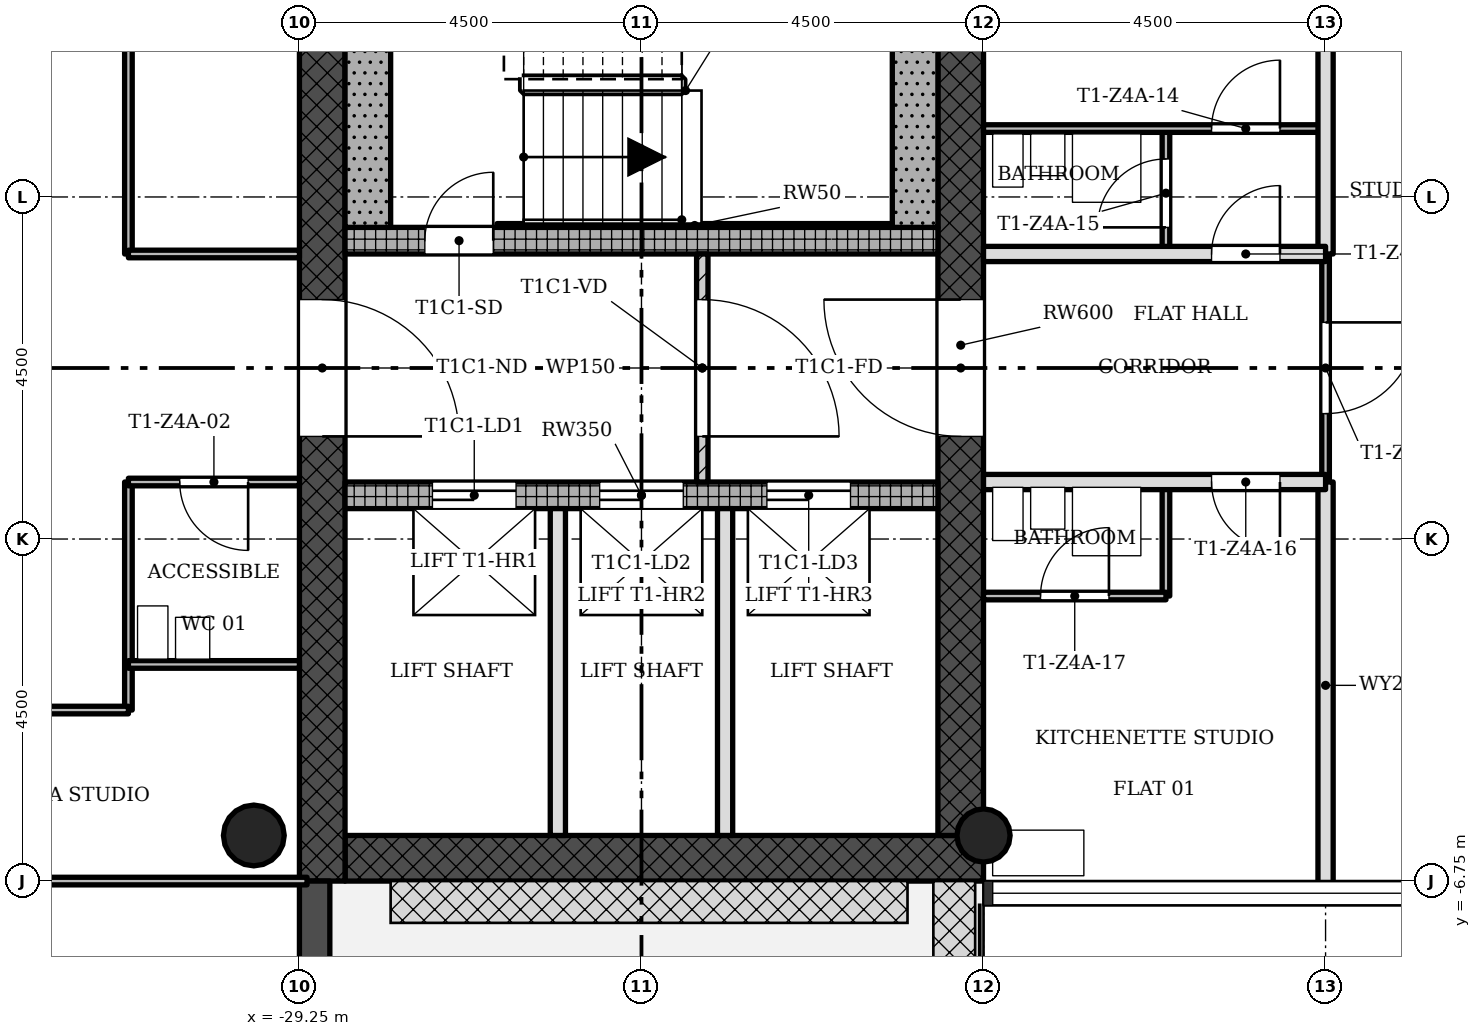
"""IFC4 building model, lengths in metres.
Left out: names, types, materials, properties, quantities, classifications, styles, units other than length and angle.
Written with IfcOpenShell. Run it as: python <this file> out.ifc"""

import sys

from ifc_helpers import new_model, si_unit, direction, frame, frame_2d, origin, origin_2d, place, context, subcontext, project, spatial, rectangle, hollow_circle, extrude, element, fill, save


model = new_model("IFC4")
c1 = context("Model", 3, precision=1e-05, world=origin(), true_north=direction((0.0, 1.0)))
c2 = subcontext(c1, "Body", "Model", "MODEL_VIEW")
j1 = project(units=[si_unit("LENGTHUNIT", "METRE"), si_unit("PLANEANGLEUNIT", "RADIAN")], contexts=[c1])
p1 = place(None, origin())
s1 = spatial("IfcSite", under=j1, at=p1, CompositionType="ELEMENT")
p2 = place(p1, origin())
s2 = spatial("IfcBuilding", under=s1, at=p2, CompositionType="ELEMENT")
p3 = place(p2, frame((0.0, 0.0, 226.6)))
s3 = spatial("IfcBuildingStorey", under=s2, at=p3, CompositionType="ELEMENT", Elevation=226.6)
p4 = place(p3, frame((-28.65, -6.45, 0.0), z_axis=(0.0, 0.0, 1.0), x_axis=(1.0, 0.0, 0.0)))
e1 = element("IfcWall", 1, at=p4, inside=s3, PredefinedType="SHEAR", context=c2, shape_type="SweptSolid", body=[
    extrude(rectangle(XDim=8.4, YDim=0.6, at=frame_2d((4.2, 0.0))), origin(), (0.0, 0.0, 1.0), 3.4),
])
p5 = place(p3, frame((-20.55, -6.15, 0.0), z_axis=(0.0, 0.0, 1.0), x_axis=(0.0, 1.0, 0.0)))
e2 = element("IfcWall", 2, at=p5, inside=s3, PredefinedType="SHEAR", context=c2, shape_type="SweptSolid", body=[
    extrude(rectangle(XDim=12.9, YDim=0.6, at=frame_2d((6.45, 0.0))), origin(), (0.0, 0.0, 1.0), 3.4),
])
p6 = place(p5, frame((5.25, 0.0, 0.0)))
e3 = element("IfcOpeningElement", 3, at=p6, cuts=e2, PredefinedType="OPENING", context=c2, shape_type="SweptSolid", body=[
    extrude(rectangle(XDim=1.8, YDim=2.1, at=frame_2d((0.9, 1.05))), frame((0.0, 0.31, 0.0), z_axis=(0.0, -1.0, 0.0), x_axis=(1.0, 0.0, 0.0)), (0.0, 0.0, 1.0), 0.62),
])
p7 = place(p3, frame((-28.95, 6.15, 0.0), z_axis=(0.0, 0.0, 1.0), x_axis=(0.0, -1.0, 0.0)))
e4 = element("IfcWall", 4, at=p7, inside=s3, PredefinedType="SHEAR", context=c2, shape_type="SweptSolid", body=[
    extrude(rectangle(XDim=12.9, YDim=0.6, at=frame_2d((6.45, 0.0))), origin(), (0.0, 0.0, 1.0), 3.4),
])
p8 = place(p7, frame((5.25, 0.0, 0.0)))
e5 = element("IfcOpeningElement", 5, at=p8, cuts=e4, PredefinedType="OPENING", context=c2, shape_type="SweptSolid", body=[
    extrude(rectangle(XDim=1.8, YDim=2.1, at=frame_2d((0.9, 1.05))), frame((0.0, 0.31, 0.0), z_axis=(0.0, -1.0, 0.0), x_axis=(1.0, 0.0, 0.0)), (0.0, 0.0, 1.0), 0.62),
])
p9 = place(p3, frame((-28.65, -1.675, 0.0), z_axis=(0.0, 0.0, 1.0), x_axis=(1.0, 0.0, 0.0)))
e6 = element("IfcWall", 6, at=p9, inside=s3, PredefinedType="SHEAR", context=c2, shape_type="SweptSolid", body=[
    extrude(rectangle(XDim=7.8, YDim=0.35, at=frame_2d((3.9, 0.0))), origin(), (0.0, 0.0, 1.0), 3.4),
])
p10 = place(p9, frame((1.15, 0.0, 0.0)))
e7 = element("IfcOpeningElement", 7, at=p10, cuts=e6, PredefinedType="OPENING", context=c2, shape_type="SweptSolid", body=[
    extrude(rectangle(XDim=1.1, YDim=2.1, at=frame_2d((0.55, 1.05))), frame((0.0, 0.185, 0.0), z_axis=(0.0, -1.0, 0.0), x_axis=(1.0, 0.0, 0.0)), (0.0, 0.0, 1.0), 0.37),
])
p11 = place(p9, frame((3.35, 0.0, 0.0)))
e8 = element("IfcOpeningElement", 8, at=p11, cuts=e6, PredefinedType="OPENING", context=c2, shape_type="SweptSolid", body=[
    extrude(rectangle(XDim=1.1, YDim=2.1, at=frame_2d((0.55, 1.05))), frame((0.0, 0.185, 0.0), z_axis=(0.0, -1.0, 0.0), x_axis=(1.0, 0.0, 0.0)), (0.0, 0.0, 1.0), 0.37),
])
p12 = place(p9, frame((5.55, 0.0, 0.0)))
e9 = element("IfcOpeningElement", 9, at=p12, cuts=e6, PredefinedType="OPENING", context=c2, shape_type="SweptSolid", body=[
    extrude(rectangle(XDim=1.1, YDim=2.1, at=frame_2d((0.55, 1.05))), frame((0.0, 0.185, 0.0), z_axis=(0.0, -1.0, 0.0), x_axis=(1.0, 0.0, 0.0)), (0.0, 0.0, 1.0), 0.37),
])
p13 = place(p3, frame((-28.65, 1.675, 0.0), z_axis=(0.0, 0.0, 1.0), x_axis=(1.0, 0.0, 0.0)))
e10 = element("IfcWall", 10, at=p13, inside=s3, PredefinedType="SHEAR", context=c2, shape_type="SweptSolid", body=[
    extrude(rectangle(XDim=7.8, YDim=0.35, at=frame_2d((3.9, 0.0))), origin(), (0.0, 0.0, 1.0), 3.4),
])
p14 = place(p13, frame((1.05, 0.0, 0.0)))
e11 = element("IfcOpeningElement", 11, at=p14, cuts=e10, PredefinedType="OPENING", context=c2, shape_type="SweptSolid", body=[
    extrude(rectangle(XDim=0.9, YDim=2.1, at=frame_2d((0.45, 1.05))), frame((0.0, 0.185, 0.0), z_axis=(0.0, -1.0, 0.0), x_axis=(1.0, 0.0, 0.0)), (0.0, 0.0, 1.0), 0.37),
])
p15 = place(p3, frame((-20.25, -6.15, 0.0), z_axis=(0.0, 0.0, 1.0), x_axis=(1.0, 0.0, 0.0)))
e12 = element("IfcColumn", 12, at=p15, inside=s3, PredefinedType="COLUMN", context=c2, shape_type="SweptSolid", body=[
    extrude(hollow_circle(Radius=0.35, WallThickness=0.025, at=origin_2d()), origin(), (0.0, 0.0, 1.0), 3.4),
])
p16 = place(p3, frame((-29.85, -6.15, 0.0), z_axis=(0.0, 0.0, 1.0), x_axis=(1.0, 0.0, 0.0)))
e13 = element("IfcColumn", 13, at=p16, inside=s3, PredefinedType="COLUMN", context=c2, shape_type="SweptSolid", body=[
    extrude(hollow_circle(Radius=0.4, WallThickness=0.028, at=origin_2d()), origin(), (0.0, 0.0, 1.0), 3.4),
])
p17 = place(p3, frame((-29.05, -11.25, -0.02), z_axis=(0.0, 0.0, 1.0), x_axis=(0.0, 1.0, 0.0)))
e14 = element("IfcWall", 14, at=p17, inside=s3, PredefinedType="STANDARD", context=c2, shape_type="SweptSolid", body=[
    extrude(rectangle(XDim=4.5, YDim=0.4, at=frame_2d((2.25, 0.0))), origin(), (0.0, 0.0, 1.0), 3.12),
])
p18 = place(p17, frame((1.35, 0.0, 0.02)))
e15 = element("IfcOpeningElement", 15, at=p18, cuts=e14, PredefinedType="OPENING", context=c2, shape_type="SweptSolid", body=[
    extrude(rectangle(XDim=1.8, YDim=2.1, at=frame_2d((0.9, 1.05))), frame((0.0, 0.21, 0.0), z_axis=(0.0, -1.0, 0.0), x_axis=(1.0, 0.0, 0.0)), (0.0, 0.0, 1.0), 0.42),
])
p19 = place(p3, frame((-23.95, -1.5, 0.0), z_axis=(0.0, 0.0, 1.0), x_axis=(0.0, 1.0, 0.0)))
e16 = element("IfcWall", 16, at=p19, inside=s3, PredefinedType="PARTITIONING", context=c2, shape_type="SweptSolid", body=[
    extrude(rectangle(XDim=3.0, YDim=0.15, at=frame_2d((1.5, 0.0))), origin(), (0.0, 0.0, 1.0), 3.0),
])
p20 = place(p19, frame((0.6, 0.0, 0.0)))
e17 = element("IfcOpeningElement", 17, at=p20, cuts=e16, PredefinedType="OPENING", context=c2, shape_type="SweptSolid", body=[
    extrude(rectangle(XDim=1.8, YDim=2.1, at=frame_2d((0.9, 1.05))), frame((0.0, 0.085, 0.0), z_axis=(0.0, -1.0, 0.0), x_axis=(1.0, 0.0, 0.0)), (0.0, 0.0, 1.0), 0.17),
])
for number, where, z_axis, x_axis in (
    (18, (-25.85, -6.15, 0.0), (0.0, 0.0, 1.0), (0.0, 1.0, 0.0)),
    (19, (-23.65, -6.15, 0.0), (0.0, 0.0, 1.0), (0.0, 1.0, 0.0)),
):
    element("IfcWall", number, at=place(p3, frame(where, z_axis=z_axis, x_axis=x_axis)), inside=s3, PredefinedType="SOLIDWALL", context=c2, shape_type="SweptSolid", body=[
        extrude(rectangle(XDim=4.3, YDim=0.2, at=frame_2d((2.15, 0.0))), origin(), (0.0, 0.0, 1.0), 3.0),
    ])
for number, where, z_axis, x_axis in (
    (20, (-31.5, -4.5, 0.0), (0.0, 0.0, 1.0), (0.0, 1.0, 0.0)),
    (21, (-31.5, 1.5, 0.0), (0.0, 0.0, 1.0), (0.0, 1.0, 0.0)),
):
    element("IfcWall", number, at=place(p3, frame(where, z_axis=z_axis, x_axis=x_axis)), inside=s3, PredefinedType="PARTITIONING", context=c2, shape_type="SweptSolid", body=[
        extrude(rectangle(XDim=3.0, YDim=0.1, at=frame_2d((1.5, 0.0))), origin(), (0.0, 0.0, 1.0), 3.0),
    ])
p21 = place(p3, frame((-17.85, -3.0, 0.0), z_axis=(0.0, 0.0, 1.0), x_axis=(0.0, 1.0, 0.0)))
e22 = element("IfcWall", 22, at=p21, inside=s3, PredefinedType="PARTITIONING", context=c2, shape_type="SweptSolid", body=[
    extrude(rectangle(XDim=1.5, YDim=0.1, at=frame_2d((0.75, 0.0))), origin(), (0.0, 0.0, 1.0), 3.0),
])
p22 = place(p3, frame((-17.85, 1.5, 0.0), z_axis=(0.0, 0.0, 1.0), x_axis=(0.0, 1.0, 0.0)))
e23 = element("IfcWall", 23, at=p22, inside=s3, PredefinedType="PARTITIONING", context=c2, shape_type="SweptSolid", body=[
    extrude(rectangle(XDim=1.65, YDim=0.1, at=frame_2d((0.825, 0.0))), origin(), (0.0, 0.0, 1.0), 3.0),
])
p23 = place(p22, frame((0.35, 0.0, 0.0)))
e24 = element("IfcOpeningElement", 24, at=p23, cuts=e23, PredefinedType="OPENING", context=c2, shape_type="SweptSolid", body=[
    extrude(rectangle(XDim=0.9, YDim=2.1, at=frame_2d((0.45, 1.05))), frame((0.0, 0.06, 0.0), z_axis=(0.0, -1.0, 0.0), x_axis=(1.0, 0.0, 0.0)), (0.0, 0.0, 1.0), 0.12),
])
p24 = place(p3, frame((-15.75, -1.5, 0.0), z_axis=(0.0, 0.0, 1.0), x_axis=(0.0, 1.0, 0.0)))
e25 = element("IfcWall", 25, at=p24, inside=s3, PredefinedType="PARTITIONING", context=c2, shape_type="SweptSolid", body=[
    extrude(rectangle(XDim=3.0, YDim=0.1, at=frame_2d((1.5, 0.0))), origin(), (0.0, 0.0, 1.0), 3.0),
])
p25 = place(p24, frame((0.9, 0.0, 0.0)))
e26 = element("IfcOpeningElement", 26, at=p25, cuts=e25, PredefinedType="OPENING", context=c2, shape_type="SweptSolid", body=[
    extrude(rectangle(XDim=1.2, YDim=2.1, at=frame_2d((0.6, 1.05))), frame((0.0, 0.06, 0.0), z_axis=(0.0, -1.0, 0.0), x_axis=(1.0, 0.0, 0.0)), (0.0, 0.0, 1.0), 0.12),
])
for number, where, z_axis, x_axis in (
    (27, (-15.75, -6.85, 0.0), (0.0, 0.0, 1.0), (0.0, 1.0, 0.0)),
    (28, (-15.75, 1.5, 0.0), (0.0, 0.0, 1.0), (0.0, 1.0, 0.0)),
):
    element("IfcWall", number, at=place(p3, frame(where, z_axis=z_axis, x_axis=x_axis)), inside=s3, PredefinedType="SOLIDWALL", context=c2, shape_type="SweptSolid", body=[
        extrude(rectangle(XDim=5.35, YDim=0.2, at=frame_2d((2.675, 0.0))), origin(), (0.0, 0.0, 1.0), 3.0),
    ])
p26 = place(p3, frame((-35.1, -6.75, 0.0), z_axis=(0.0, 0.0, 1.0), x_axis=(1.0, 0.0, 0.0)))
e29 = element("IfcWall", 29, at=p26, inside=s3, PredefinedType="PARTITIONING", context=c2, shape_type="SweptSolid", body=[
    extrude(rectangle(XDim=5.95, YDim=0.1, at=frame_2d((2.975, 0.0))), origin(), (0.0, 0.0, 1.0), 3.0),
])
p27 = place(p3, frame((-35.1, -4.5, 0.0), z_axis=(0.0, 0.0, 1.0), x_axis=(1.0, 0.0, 0.0)))
e30 = element("IfcWall", 30, at=p27, inside=s3, PredefinedType="PARTITIONING", context=c2, shape_type="SweptSolid", body=[
    extrude(rectangle(XDim=3.6, YDim=0.1, at=frame_2d((1.8, 0.0))), origin(), (0.0, 0.0, 1.0), 3.0),
])
p28 = place(p27, frame((1.35, 0.0, 0.0)))
e31 = element("IfcOpeningElement", 31, at=p28, cuts=e30, PredefinedType="OPENING", context=c2, shape_type="SweptSolid", body=[
    extrude(rectangle(XDim=0.9, YDim=2.1, at=frame_2d((0.45, 1.05))), frame((0.0, 0.06, 0.0), z_axis=(0.0, -1.0, 0.0), x_axis=(1.0, 0.0, 0.0)), (0.0, 0.0, 1.0), 0.12),
])
p29 = place(p3, frame((-31.5, -3.9, 0.0), z_axis=(0.0, 0.0, 1.0), x_axis=(1.0, 0.0, 0.0)))
e32 = element("IfcWall", 32, at=p29, inside=s3, PredefinedType="PARTITIONING", context=c2, shape_type="SweptSolid", body=[
    extrude(rectangle(XDim=2.25, YDim=0.1, at=frame_2d((1.125, 0.0))), origin(), (0.0, 0.0, 1.0), 3.0),
])
p30 = place(p3, frame((-20.25, -3.0, 0.0), z_axis=(0.0, 0.0, 1.0), x_axis=(1.0, 0.0, 0.0)))
e33 = element("IfcWall", 33, at=p30, inside=s3, PredefinedType="PARTITIONING", context=c2, shape_type="SweptSolid", body=[
    extrude(rectangle(XDim=2.4, YDim=0.1, at=frame_2d((1.2, 0.0))), origin(), (0.0, 0.0, 1.0), 3.0),
])
p31 = place(p30, frame((0.75, 0.0, 0.0)))
e34 = element("IfcOpeningElement", 34, at=p31, cuts=e33, PredefinedType="OPENING", context=c2, shape_type="SweptSolid", body=[
    extrude(rectangle(XDim=0.9, YDim=2.1, at=frame_2d((0.45, 1.05))), frame((0.0, 0.06, 0.0), z_axis=(0.0, -1.0, 0.0), x_axis=(1.0, 0.0, 0.0)), (0.0, 0.0, 1.0), 0.12),
])
p32 = place(p3, frame((-31.5, -1.5, 0.0), z_axis=(0.0, 0.0, 1.0), x_axis=(1.0, 0.0, 0.0)))
e35 = element("IfcWall", 35, at=p32, inside=s3, PredefinedType="PARTITIONING", context=c2, shape_type="SweptSolid", body=[
    extrude(rectangle(XDim=2.25, YDim=0.1, at=frame_2d((1.125, 0.0))), origin(), (0.0, 0.0, 1.0), 3.0),
])
p33 = place(p32, frame((0.675, 0.0, 0.0)))
e36 = element("IfcOpeningElement", 36, at=p33, cuts=e35, PredefinedType="OPENING", context=c2, shape_type="SweptSolid", body=[
    extrude(rectangle(XDim=0.9, YDim=2.1, at=frame_2d((0.45, 1.05))), frame((0.0, 0.06, 0.0), z_axis=(0.0, -1.0, 0.0), x_axis=(1.0, 0.0, 0.0)), (0.0, 0.0, 1.0), 0.12),
])
p34 = place(p3, frame((-20.25, -1.5, 0.0), z_axis=(0.0, 0.0, 1.0), x_axis=(1.0, 0.0, 0.0)))
e37 = element("IfcWall", 37, at=p34, inside=s3, PredefinedType="SOLIDWALL", context=c2, shape_type="SweptSolid", body=[
    extrude(rectangle(XDim=4.5, YDim=0.2, at=frame_2d((2.25, 0.0))), origin(), (0.0, 0.0, 1.0), 3.0),
])
p35 = place(p34, frame((3.0, 0.0, 0.0)))
e38 = element("IfcOpeningElement", 38, at=p35, cuts=e37, PredefinedType="OPENING", context=c2, shape_type="SweptSolid", body=[
    extrude(rectangle(XDim=0.9, YDim=2.1, at=frame_2d((0.45, 1.05))), frame((0.0, 0.11, 0.0), z_axis=(0.0, -1.0, 0.0), x_axis=(1.0, 0.0, 0.0)), (0.0, 0.0, 1.0), 0.22),
])
p36 = place(p3, frame((-31.5, 1.5, 0.0), z_axis=(0.0, 0.0, 1.0), x_axis=(1.0, 0.0, 0.0)))
e39 = element("IfcWall", 39, at=p36, inside=s3, PredefinedType="PARTITIONING", context=c2, shape_type="SweptSolid", body=[
    extrude(rectangle(XDim=2.25, YDim=0.1, at=frame_2d((1.125, 0.0))), origin(), (0.0, 0.0, 1.0), 3.0),
])
p37 = place(p3, frame((-20.25, 1.5, 0.0), z_axis=(0.0, 0.0, 1.0), x_axis=(1.0, 0.0, 0.0)))
e40 = element("IfcWall", 40, at=p37, inside=s3, PredefinedType="SOLIDWALL", context=c2, shape_type="SweptSolid", body=[
    extrude(rectangle(XDim=4.5, YDim=0.2, at=frame_2d((2.25, 0.0))), origin(), (0.0, 0.0, 1.0), 3.0),
])
p38 = place(p37, frame((3.0, 0.0, 0.0)))
e41 = element("IfcOpeningElement", 41, at=p38, cuts=e40, PredefinedType="OPENING", context=c2, shape_type="SweptSolid", body=[
    extrude(rectangle(XDim=0.9, YDim=2.1, at=frame_2d((0.45, 1.05))), frame((0.0, 0.11, 0.0), z_axis=(0.0, -1.0, 0.0), x_axis=(1.0, 0.0, 0.0)), (0.0, 0.0, 1.0), 0.22),
])
p39 = place(p3, frame((-20.25, 3.15, 0.0), z_axis=(0.0, 0.0, 1.0), x_axis=(1.0, 0.0, 0.0)))
e42 = element("IfcWall", 42, at=p39, inside=s3, PredefinedType="PARTITIONING", context=c2, shape_type="SweptSolid", body=[
    extrude(rectangle(XDim=4.5, YDim=0.1, at=frame_2d((2.25, 0.0))), origin(), (0.0, 0.0, 1.0), 3.0),
])
p40 = place(p39, frame((3.0, 0.0, 0.0)))
e43 = element("IfcOpeningElement", 43, at=p40, cuts=e42, PredefinedType="OPENING", context=c2, shape_type="SweptSolid", body=[
    extrude(rectangle(XDim=0.9, YDim=2.1, at=frame_2d((0.45, 1.05))), frame((0.0, 0.06, 0.0), z_axis=(0.0, -1.0, 0.0), x_axis=(1.0, 0.0, 0.0)), (0.0, 0.0, 1.0), 0.12),
])
for number, where, z_axis, x_axis in (
    (44, (-21.15, 1.85, 0.0), (0.0, 0.0, 1.0), (0.0, 1.0, 0.0)),
    (45, (-28.35, 1.85, 0.0), (0.0, 0.0, 1.0), (0.0, 1.0, 0.0)),
):
    element("IfcWall", number, at=place(p3, frame(where, z_axis=z_axis, x_axis=x_axis)), inside=s3, PredefinedType="SHEAR", context=c2, shape_type="SweptSolid", body=[
        extrude(rectangle(XDim=4.3, YDim=0.6, at=frame_2d((2.15, 0.0))), origin(), (0.0, 0.0, 1.0), 3.4),
    ])
p41 = place(p3, frame((-26.65, 1.875, 0.0), z_axis=(0.0, 0.0, 1.0), x_axis=(1.0, 0.0, 0.0)))
e46 = element("IfcWall", 46, at=p41, inside=s3, PredefinedType="SHEAR", context=c2, shape_type="SweptSolid", body=[
    extrude(rectangle(XDim=5.2, YDim=0.05, at=frame_2d((2.6, 0.0))), origin(), (0.0, 0.0, 1.0), 3.4),
])
p42 = place(p20, origin())
e47 = element("IfcDoor", 47, at=p42, inside=s3, OperationType="SINGLE_SWING_LEFT", PredefinedType="DOOR", context=c2, shape_type="SweptSolid", body=[
    extrude(rectangle(XDim=1.8, YDim=2.1, at=frame_2d((0.9, 1.05))), frame((0.0, 0.025, 0.0), z_axis=(0.0, -1.0, 0.0), x_axis=(1.0, 0.0, 0.0)), (0.0, 0.0, 1.0), 0.05),
])
fill(e17, e47)
p43 = place(p33, origin())
e48 = element("IfcDoor", 48, at=p43, inside=s3, OperationType="SINGLE_SWING_RIGHT", PredefinedType="DOOR", context=c2, shape_type="SweptSolid", body=[
    extrude(rectangle(XDim=0.9, YDim=2.1, at=frame_2d((0.45, 1.05))), frame((0.0, 0.025, 0.0), z_axis=(0.0, -1.0, 0.0), x_axis=(1.0, 0.0, 0.0)), (0.0, 0.0, 1.0), 0.05),
])
fill(e36, e48)
p44 = place(p38, origin())
e49 = element("IfcDoor", 49, at=p44, inside=s3, OperationType="SINGLE_SWING_LEFT", PredefinedType="DOOR", context=c2, shape_type="SweptSolid", body=[
    extrude(rectangle(XDim=0.9, YDim=2.1, at=frame_2d((0.45, 1.05))), frame((0.0, 0.025, 0.0), z_axis=(0.0, -1.0, 0.0), x_axis=(1.0, 0.0, 0.0)), (0.0, 0.0, 1.0), 0.05),
])
fill(e41, e49)
p45 = place(p40, origin())
e50 = element("IfcDoor", 50, at=p45, inside=s3, OperationType="SINGLE_SWING_LEFT", PredefinedType="DOOR", context=c2, shape_type="SweptSolid", body=[
    extrude(rectangle(XDim=0.9, YDim=2.1, at=frame_2d((0.45, 1.05))), frame((0.0, 0.025, 0.0), z_axis=(0.0, -1.0, 0.0), x_axis=(1.0, 0.0, 0.0)), (0.0, 0.0, 1.0), 0.05),
])
fill(e43, e50)
p46 = place(p23, origin())
e51 = element("IfcDoor", 51, at=p46, inside=s3, OperationType="SINGLE_SWING_RIGHT", PredefinedType="DOOR", context=c2, shape_type="SweptSolid", body=[
    extrude(rectangle(XDim=0.9, YDim=2.1, at=frame_2d((0.45, 1.05))), frame((0.0, 0.025, 0.0), z_axis=(0.0, -1.0, 0.0), x_axis=(1.0, 0.0, 0.0)), (0.0, 0.0, 1.0), 0.05),
])
fill(e24, e51)
p47 = place(p35, origin())
e52 = element("IfcDoor", 52, at=p47, inside=s3, OperationType="SINGLE_SWING_RIGHT", PredefinedType="DOOR", context=c2, shape_type="SweptSolid", body=[
    extrude(rectangle(XDim=0.9, YDim=2.1, at=frame_2d((0.45, 1.05))), frame((0.0, 0.025, 0.0), z_axis=(0.0, -1.0, 0.0), x_axis=(1.0, 0.0, 0.0)), (0.0, 0.0, 1.0), 0.05),
])
fill(e38, e52)
p48 = place(p31, origin())
e53 = element("IfcDoor", 53, at=p48, inside=s3, OperationType="SINGLE_SWING_LEFT", PredefinedType="DOOR", context=c2, shape_type="SweptSolid", body=[
    extrude(rectangle(XDim=0.9, YDim=2.1, at=frame_2d((0.45, 1.05))), frame((0.0, 0.025, 0.0), z_axis=(0.0, -1.0, 0.0), x_axis=(1.0, 0.0, 0.0)), (0.0, 0.0, 1.0), 0.05),
])
fill(e34, e53)
p49 = place(p25, origin())
e54 = element("IfcDoor", 54, at=p49, inside=s3, OperationType="SINGLE_SWING_RIGHT", PredefinedType="DOOR", context=c2, shape_type="SweptSolid", body=[
    extrude(rectangle(XDim=1.2, YDim=2.1, at=frame_2d((0.6, 1.05))), frame((0.0, 0.025, 0.0), z_axis=(0.0, -1.0, 0.0), x_axis=(1.0, 0.0, 0.0)), (0.0, 0.0, 1.0), 0.05),
])
fill(e26, e54)
p50 = place(p14, origin())
e55 = element("IfcDoor", 55, at=p50, inside=s3, OperationType="SINGLE_SWING_LEFT", PredefinedType="DOOR", context=c2, shape_type="SweptSolid", body=[
    extrude(rectangle(XDim=0.9, YDim=2.1, at=frame_2d((0.45, 1.05))), frame((0.0, 0.025, 0.0), z_axis=(0.0, -1.0, 0.0), x_axis=(1.0, 0.0, 0.0)), (0.0, 0.0, 1.0), 0.05),
])
fill(e11, e55)
p51 = place(p10, origin())
e56 = element("IfcDoor", 56, at=p51, inside=s3, OperationType="SLIDING_TO_LEFT", PredefinedType="DOOR", context=c2, shape_type="SweptSolid", body=[
    extrude(rectangle(XDim=1.1, YDim=2.1, at=frame_2d((0.55, 1.05))), frame((0.0, 0.025, 0.0), z_axis=(0.0, -1.0, 0.0), x_axis=(1.0, 0.0, 0.0)), (0.0, 0.0, 1.0), 0.05),
])
fill(e7, e56)
p52 = place(p11, origin())
e57 = element("IfcDoor", 57, at=p52, inside=s3, OperationType="SLIDING_TO_LEFT", PredefinedType="DOOR", context=c2, shape_type="SweptSolid", body=[
    extrude(rectangle(XDim=1.1, YDim=2.1, at=frame_2d((0.55, 1.05))), frame((0.0, 0.025, 0.0), z_axis=(0.0, -1.0, 0.0), x_axis=(1.0, 0.0, 0.0)), (0.0, 0.0, 1.0), 0.05),
])
fill(e8, e57)
p53 = place(p12, origin())
e58 = element("IfcDoor", 58, at=p53, inside=s3, OperationType="SLIDING_TO_LEFT", PredefinedType="DOOR", context=c2, shape_type="SweptSolid", body=[
    extrude(rectangle(XDim=1.1, YDim=2.1, at=frame_2d((0.55, 1.05))), frame((0.0, 0.025, 0.0), z_axis=(0.0, -1.0, 0.0), x_axis=(1.0, 0.0, 0.0)), (0.0, 0.0, 1.0), 0.05),
])
fill(e9, e58)
p54 = place(p8, origin())
e59 = element("IfcDoor", 59, at=p54, inside=s3, OperationType="SINGLE_SWING_LEFT", PredefinedType="DOOR", context=c2, shape_type="SweptSolid", body=[
    extrude(rectangle(XDim=1.8, YDim=2.1, at=frame_2d((0.9, 1.05))), frame((0.0, 0.025, 0.0), z_axis=(0.0, -1.0, 0.0), x_axis=(1.0, 0.0, 0.0)), (0.0, 0.0, 1.0), 0.05),
])
fill(e5, e59)
p55 = place(p6, origin())
e60 = element("IfcDoor", 60, at=p55, inside=s3, OperationType="SINGLE_SWING_LEFT", PredefinedType="DOOR", context=c2, shape_type="SweptSolid", body=[
    extrude(rectangle(XDim=1.8, YDim=2.1, at=frame_2d((0.9, 1.05))), frame((0.0, 0.025, 0.0), z_axis=(0.0, -1.0, 0.0), x_axis=(1.0, 0.0, 0.0)), (0.0, 0.0, 1.0), 0.05),
])
fill(e3, e60)
save(model, sys.argv[1])
